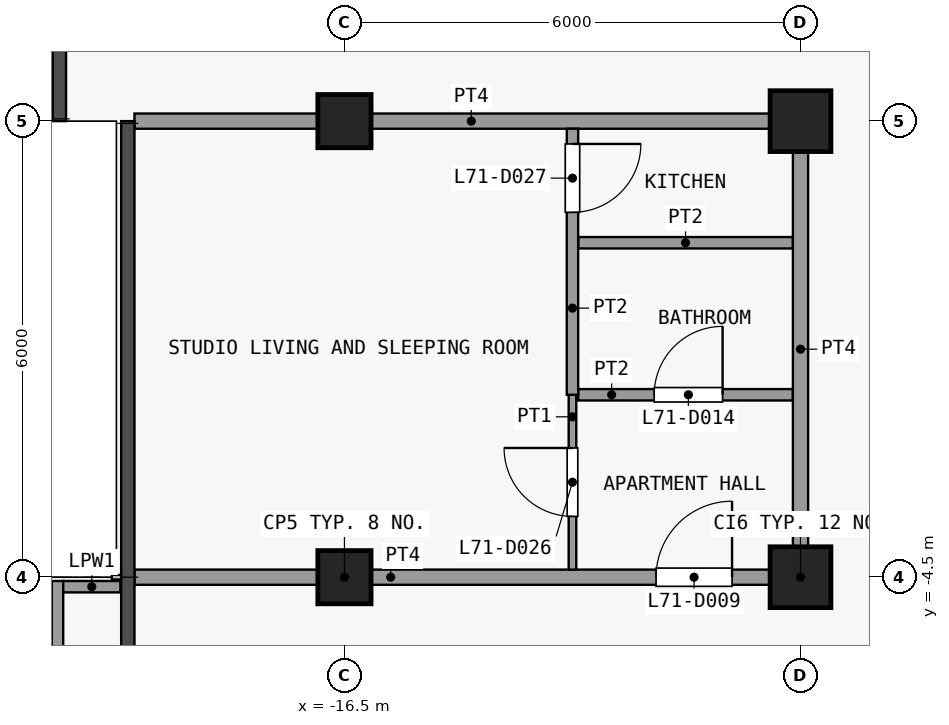
"""IFC4 building model, lengths in metres.
Left out: names, types, materials, properties, quantities, classifications, styles, units other than length and angle.
Written with IfcOpenShell. Run it as: python <this file> out.ifc"""

import sys

from ifc_helpers import new_model, si_unit, direction, frame, frame_2d, origin, origin_2d, place, context, subcontext, project, spatial, rectangle, extrude, element, fill, save


model = new_model("IFC4")
c1 = context("Model", 3, precision=1e-05, world=origin(), true_north=direction((0.0, 1.0)))
c2 = subcontext(c1, "Body", "Model", "MODEL_VIEW")
j1 = project(units=[si_unit("LENGTHUNIT", "METRE"), si_unit("PLANEANGLEUNIT", "RADIAN")], contexts=[c1])
p1 = place(None, origin())
s1 = spatial("IfcSite", under=j1, at=p1, CompositionType="ELEMENT")
p2 = place(p1, origin())
s2 = spatial("IfcBuilding", under=s1, at=p2, CompositionType="ELEMENT")
p3 = place(p2, frame((0.0, 0.0, 280.7)))
s3 = spatial("IfcBuildingStorey", under=s2, at=p3, CompositionType="ELEMENT", Elevation=280.7)
for number, where, z_axis, x_axis in (
    (1, (-16.5, -4.5, 0.0), (0.0, 0.0, 1.0), (1.0, 0.0, 0.0)),
    (2, (-16.5, 1.5, 0.0), (0.0, 0.0, 1.0), (1.0, 0.0, 0.0)),
):
    element("IfcColumn", number, at=place(p3, frame(where, z_axis=z_axis, x_axis=x_axis)), inside=s3, PredefinedType="COLUMN", context=c2, shape_type="SweptSolid", body=[
        extrude(rectangle(XDim=0.7, YDim=0.7, at=origin_2d()), origin(), (0.0, 0.0, 1.0), 3.6),
    ])
for number, where, z_axis, x_axis in (
    (3, (-10.5, -4.5, 0.0), (0.0, 0.0, 1.0), (1.0, 0.0, 0.0)),
    (4, (-10.5, 1.5, 0.0), (0.0, 0.0, 1.0), (1.0, 0.0, 0.0)),
):
    element("IfcColumn", number, at=place(p3, frame(where, z_axis=z_axis, x_axis=x_axis)), inside=s3, PredefinedType="COLUMN", context=c2, shape_type="SweptSolid", body=[
        extrude(rectangle(XDim=0.8, YDim=0.8, at=origin_2d()), origin(), (0.0, 0.0, 1.0), 3.6),
    ])
p4 = place(p3, frame((-20.275, -13.3, 0.0), z_axis=(0.0, 0.0, 1.0), x_axis=(0.0, 1.0, 0.0)))
e5 = element("IfcWall", 5, at=p4, inside=s3, PredefinedType="PARAPET", context=c2, shape_type="SweptSolid", body=[
    extrude(rectangle(XDim=8.75, YDim=0.15, at=frame_2d((4.375, 0.0))), origin(), (0.0, 0.0, 1.0), 1.15),
])
p5 = place(p3, frame((-20.2, -4.625, 0.0), z_axis=(0.0, 0.0, 1.0), x_axis=(1.0, 0.0, 0.0)))
e6 = element("IfcWall", 6, at=p5, inside=s3, PredefinedType="PARAPET", context=c2, shape_type="SweptSolid", body=[
    extrude(rectangle(XDim=0.752, YDim=0.15, at=frame_2d((0.376, 0.0))), origin(), (0.0, 0.0, 1.0), 1.15),
])
p6 = place(p3, frame((-19.262, -4.5, 0.0), z_axis=(0.0, 0.0, 1.0), x_axis=(1.0, 0.0, 0.0)))
e7 = element("IfcWall", 7, at=p6, inside=s3, PredefinedType="PARTITIONING", context=c2, shape_type="SweptSolid", body=[
    extrude(rectangle(XDim=8.863, YDim=0.2, at=frame_2d((4.431, 0.0))), origin(), (0.0, 0.0, 1.0), 3.3),
])
p7 = place(p6, frame((6.862, 0.0, 0.0)))
e8 = element("IfcOpeningElement", 8, at=p7, cuts=e7, PredefinedType="OPENING", context=c2, shape_type="SweptSolid", body=[
    extrude(rectangle(XDim=1.0, YDim=2.1, at=frame_2d((0.5, 1.05))), frame((0.0, 0.11, 0.0), z_axis=(0.0, -1.0, 0.0), x_axis=(1.0, 0.0, 0.0)), (0.0, 0.0, 1.0), 0.22),
])
p8 = place(p3, frame((-13.425, -2.1, 0.0), z_axis=(0.0, 0.0, 1.0), x_axis=(1.0, 0.0, 0.0)))
e9 = element("IfcWall", 9, at=p8, inside=s3, PredefinedType="PARTITIONING", context=c2, shape_type="SweptSolid", body=[
    extrude(rectangle(XDim=2.825, YDim=0.15, at=frame_2d((1.413, 0.0))), origin(), (0.0, 0.0, 1.0), 3.3),
])
p9 = place(p8, frame((1.0, 0.0, 0.0)))
e10 = element("IfcOpeningElement", 10, at=p9, cuts=e9, PredefinedType="OPENING", context=c2, shape_type="SweptSolid", body=[
    extrude(rectangle(XDim=0.9, YDim=2.1, at=frame_2d((0.45, 1.05))), frame((0.0, 0.085, 0.0), z_axis=(0.0, -1.0, 0.0), x_axis=(1.0, 0.0, 0.0)), (0.0, 0.0, 1.0), 0.17),
])
p10 = place(p3, frame((-13.425, -0.1, 0.0), z_axis=(0.0, 0.0, 1.0), x_axis=(1.0, 0.0, 0.0)))
e11 = element("IfcWall", 11, at=p10, inside=s3, PredefinedType="PARTITIONING", context=c2, shape_type="SweptSolid", body=[
    extrude(rectangle(XDim=2.825, YDim=0.15, at=frame_2d((1.413, 0.0))), origin(), (0.0, 0.0, 1.0), 3.3),
])
p11 = place(p3, frame((-19.262, 1.5, 0.0), z_axis=(0.0, 0.0, 1.0), x_axis=(1.0, 0.0, 0.0)))
e12 = element("IfcWall", 12, at=p11, inside=s3, PredefinedType="PARTITIONING", context=c2, shape_type="SweptSolid", body=[
    extrude(rectangle(XDim=8.863, YDim=0.2, at=frame_2d((4.431, 0.0))), origin(), (0.0, 0.0, 1.0), 3.3),
])
p12 = place(p3, frame((-13.5, -4.4, 0.0), z_axis=(0.0, 0.0, 1.0), x_axis=(0.0, 1.0, 0.0)))
e13 = element("IfcWall", 13, at=p12, inside=s3, PredefinedType="PARTITIONING", context=c2, shape_type="SweptSolid", body=[
    extrude(rectangle(XDim=2.3, YDim=0.1, at=frame_2d((1.15, 0.0))), origin(), (0.0, 0.0, 1.0), 3.3),
])
p13 = place(p12, frame((0.7, 0.0, 0.0)))
e14 = element("IfcOpeningElement", 14, at=p13, cuts=e13, PredefinedType="OPENING", context=c2, shape_type="SweptSolid", body=[
    extrude(rectangle(XDim=0.9, YDim=2.1, at=frame_2d((0.45, 1.05))), frame((0.0, 0.06, 0.0), z_axis=(0.0, -1.0, 0.0), x_axis=(1.0, 0.0, 0.0)), (0.0, 0.0, 1.0), 0.12),
])
p14 = place(p3, frame((-13.5, -2.1, 0.0), z_axis=(0.0, 0.0, 1.0), x_axis=(0.0, 1.0, 0.0)))
e15 = element("IfcWall", 15, at=p14, inside=s3, PredefinedType="PARTITIONING", context=c2, shape_type="SweptSolid", body=[
    extrude(rectangle(XDim=3.5, YDim=0.15, at=frame_2d((1.75, 0.0))), origin(), (0.0, 0.0, 1.0), 3.3),
])
p15 = place(p14, frame((2.4, 0.0, 0.0)))
e16 = element("IfcOpeningElement", 16, at=p15, cuts=e15, PredefinedType="OPENING", context=c2, shape_type="SweptSolid", body=[
    extrude(rectangle(XDim=0.9, YDim=2.1, at=frame_2d((0.45, 1.05))), frame((0.0, 0.085, 0.0), z_axis=(0.0, -1.0, 0.0), x_axis=(1.0, 0.0, 0.0)), (0.0, 0.0, 1.0), 0.17),
])
p16 = place(p3, frame((-10.5, -4.4, 0.0), z_axis=(0.0, 0.0, 1.0), x_axis=(0.0, 1.0, 0.0)))
e17 = element("IfcWall", 17, at=p16, inside=s3, PredefinedType="PARTITIONING", context=c2, shape_type="SweptSolid", body=[
    extrude(rectangle(XDim=5.8, YDim=0.2, at=frame_2d((2.9, 0.0))), origin(), (0.0, 0.0, 1.0), 3.3),
])
p17 = place(p7, origin())
e18 = element("IfcDoor", 18, at=p17, inside=s3, OperationType="SINGLE_SWING_LEFT", PredefinedType="DOOR", context=c2, shape_type="SweptSolid", body=[
    extrude(rectangle(XDim=1.0, YDim=2.1, at=frame_2d((0.5, 1.05))), frame((0.0, 0.025, 0.0), z_axis=(0.0, -1.0, 0.0), x_axis=(1.0, 0.0, 0.0)), (0.0, 0.0, 1.0), 0.05),
])
fill(e8, e18)
p18 = place(p9, origin())
e19 = element("IfcDoor", 19, at=p18, inside=s3, OperationType="SINGLE_SWING_LEFT", PredefinedType="DOOR", context=c2, shape_type="SweptSolid", body=[
    extrude(rectangle(XDim=0.9, YDim=2.1, at=frame_2d((0.45, 1.05))), frame((0.0, 0.025, 0.0), z_axis=(0.0, -1.0, 0.0), x_axis=(1.0, 0.0, 0.0)), (0.0, 0.0, 1.0), 0.05),
])
fill(e10, e19)
p19 = place(p13, origin())
e20 = element("IfcDoor", 20, at=p19, inside=s3, OperationType="SINGLE_SWING_LEFT", PredefinedType="DOOR", context=c2, shape_type="SweptSolid", body=[
    extrude(rectangle(XDim=0.9, YDim=2.1, at=frame_2d((0.45, 1.05))), frame((0.0, 0.025, 0.0), z_axis=(0.0, -1.0, 0.0), x_axis=(1.0, 0.0, 0.0)), (0.0, 0.0, 1.0), 0.05),
])
fill(e14, e20)
p20 = place(p15, origin())
e21 = element("IfcDoor", 21, at=p20, inside=s3, OperationType="SINGLE_SWING_RIGHT", PredefinedType="DOOR", context=c2, shape_type="SweptSolid", body=[
    extrude(rectangle(XDim=0.9, YDim=2.1, at=frame_2d((0.45, 1.05))), frame((0.0, 0.025, 0.0), z_axis=(0.0, -1.0, 0.0), x_axis=(1.0, 0.0, 0.0)), (0.0, 0.0, 1.0), 0.05),
])
fill(e16, e21)
save(model, sys.argv[1])
